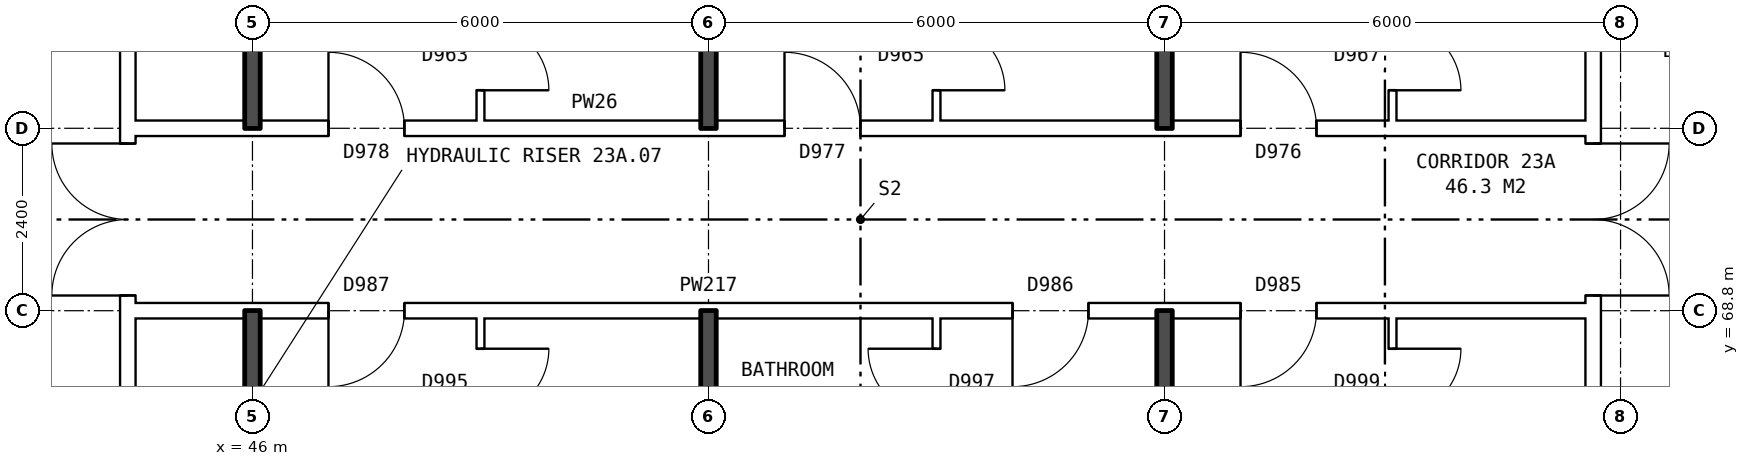
"""IFC4 building model, lengths in metres.
Left out: names, types, materials, properties, quantities, classifications, styles, units other than length and angle.
Written with IfcOpenShell. Run it as: python <this file> out.ifc"""

import sys

from ifc_helpers import new_model, si_unit, direction, frame, frame_2d, origin, place, context, subcontext, project, spatial, rectangle, extrude, element, fill, save


model = new_model("IFC4")
c1 = context("Model", 3, precision=1e-05, world=origin(), true_north=direction((0.0, 1.0)))
c2 = subcontext(c1, "Body", "Model", "MODEL_VIEW")
j1 = project(units=[si_unit("LENGTHUNIT", "METRE"), si_unit("PLANEANGLEUNIT", "RADIAN")], contexts=[c1])
p1 = place(None, origin())
s1 = spatial("IfcSite", under=j1, at=p1, CompositionType="ELEMENT")
p2 = place(p1, origin())
s2 = spatial("IfcBuilding", under=s1, at=p2, CompositionType="ELEMENT")
p3 = place(p2, frame((0.0, 0.0, 84.0)))
s3 = spatial("IfcBuildingStorey", under=s2, at=p3, CompositionType="ELEMENT", Elevation=84.0)
p4 = place(p3, frame((63.64, 63.9, 0.0), z_axis=(0.0, 0.0, 1.0), x_axis=(0.0, 1.0, 0.0)))
e1 = element("IfcWall", 1, at=p4, inside=s3, PredefinedType="PARTITIONING", context=c2, shape_type="SweptSolid", body=[
    extrude(rectangle(XDim=12.2, YDim=0.2, at=frame_2d((6.1, 0.0))), origin(), (0.0, 0.0, 1.0), 2.85),
])
p5 = place(p4, frame((5.1, 0.0, 0.0)))
e2 = element("IfcOpeningElement", 2, at=p5, cuts=e1, PredefinedType="OPENING", context=c2, shape_type="SweptSolid", body=[
    extrude(rectangle(XDim=2.0, YDim=2.1, at=frame_2d((1.0, 1.05))), frame((0.0, 0.11, 0.0), z_axis=(0.0, -1.0, 0.0), x_axis=(1.0, 0.0, 0.0)), (0.0, 0.0, 1.0), 0.22),
])
p6 = place(p3, frame((44.36, 63.9, 0.0), z_axis=(0.0, 0.0, 1.0), x_axis=(0.0, 1.0, 0.0)))
e3 = element("IfcWall", 3, at=p6, inside=s3, PredefinedType="PARTITIONING", context=c2, shape_type="SweptSolid", body=[
    extrude(rectangle(XDim=12.2, YDim=0.2, at=frame_2d((6.1, 0.0))), origin(), (0.0, 0.0, 1.0), 2.85),
])
p7 = place(p6, frame((5.1, 0.0, 0.0)))
e4 = element("IfcOpeningElement", 4, at=p7, cuts=e3, PredefinedType="OPENING", context=c2, shape_type="SweptSolid", body=[
    extrude(rectangle(XDim=2.0, YDim=2.1, at=frame_2d((1.0, 1.05))), frame((0.0, 0.11, 0.0), z_axis=(0.0, -1.0, 0.0), x_axis=(1.0, 0.0, 0.0)), (0.0, 0.0, 1.0), 0.22),
])
p8 = place(p3, frame((44.36, 68.8, 0.0), z_axis=(0.0, 0.0, 1.0), x_axis=(1.0, 0.0, 0.0)))
e5 = element("IfcWall", 5, at=p8, inside=s3, PredefinedType="PARTITIONING", context=c2, shape_type="SweptSolid", body=[
    extrude(rectangle(XDim=19.28, YDim=0.2, at=frame_2d((9.64, 0.0))), origin(), (0.0, 0.0, 1.0), 2.85),
])
p9 = place(p8, frame((14.64, 0.0, 0.0)))
e6 = element("IfcOpeningElement", 6, at=p9, cuts=e5, PredefinedType="OPENING", context=c2, shape_type="SweptSolid", body=[
    extrude(rectangle(XDim=1.0, YDim=2.1, at=frame_2d((0.5, 1.05))), frame((0.0, 0.11, 0.0), z_axis=(0.0, -1.0, 0.0), x_axis=(1.0, 0.0, 0.0)), (0.0, 0.0, 1.0), 0.22),
])
p10 = place(p8, frame((11.64, 0.0, 0.0)))
e7 = element("IfcOpeningElement", 7, at=p10, cuts=e5, PredefinedType="OPENING", context=c2, shape_type="SweptSolid", body=[
    extrude(rectangle(XDim=1.0, YDim=2.1, at=frame_2d((0.5, 1.05))), frame((0.0, 0.11, 0.0), z_axis=(0.0, -1.0, 0.0), x_axis=(1.0, 0.0, 0.0)), (0.0, 0.0, 1.0), 0.22),
])
p11 = place(p8, frame((2.64, 0.0, 0.0)))
e8 = element("IfcOpeningElement", 8, at=p11, cuts=e5, PredefinedType="OPENING", context=c2, shape_type="SweptSolid", body=[
    extrude(rectangle(XDim=1.0, YDim=2.1, at=frame_2d((0.5, 1.05))), frame((0.0, 0.11, 0.0), z_axis=(0.0, -1.0, 0.0), x_axis=(1.0, 0.0, 0.0)), (0.0, 0.0, 1.0), 0.22),
])
p12 = place(p3, frame((44.36, 71.2, 0.0), z_axis=(0.0, 0.0, 1.0), x_axis=(1.0, 0.0, 0.0)))
e9 = element("IfcWall", 9, at=p12, inside=s3, PredefinedType="PARTITIONING", context=c2, shape_type="SweptSolid", body=[
    extrude(rectangle(XDim=19.28, YDim=0.2, at=frame_2d((9.64, 0.0))), origin(), (0.0, 0.0, 1.0), 2.85),
])
p13 = place(p12, frame((14.64, 0.0, 0.0)))
e10 = element("IfcOpeningElement", 10, at=p13, cuts=e9, PredefinedType="OPENING", context=c2, shape_type="SweptSolid", body=[
    extrude(rectangle(XDim=1.0, YDim=2.1, at=frame_2d((0.5, 1.05))), frame((0.0, 0.11, 0.0), z_axis=(0.0, -1.0, 0.0), x_axis=(1.0, 0.0, 0.0)), (0.0, 0.0, 1.0), 0.22),
])
p14 = place(p12, frame((8.64, 0.0, 0.0)))
e11 = element("IfcOpeningElement", 11, at=p14, cuts=e9, PredefinedType="OPENING", context=c2, shape_type="SweptSolid", body=[
    extrude(rectangle(XDim=1.0, YDim=2.1, at=frame_2d((0.5, 1.05))), frame((0.0, 0.11, 0.0), z_axis=(0.0, -1.0, 0.0), x_axis=(1.0, 0.0, 0.0)), (0.0, 0.0, 1.0), 0.22),
])
p15 = place(p12, frame((2.64, 0.0, 0.0)))
e12 = element("IfcOpeningElement", 12, at=p15, cuts=e9, PredefinedType="OPENING", context=c2, shape_type="SweptSolid", body=[
    extrude(rectangle(XDim=1.0, YDim=2.1, at=frame_2d((0.5, 1.05))), frame((0.0, 0.11, 0.0), z_axis=(0.0, -1.0, 0.0), x_axis=(1.0, 0.0, 0.0)), (0.0, 0.0, 1.0), 0.22),
])
for number, where, z_axis, x_axis in (
    (13, (46.0, 63.8, 0.0), (0.0, 0.0, 1.0), (0.0, 1.0, 0.0)),
    (14, (46.0, 71.2, 0.0), (0.0, 0.0, 1.0), (0.0, 1.0, 0.0)),
):
    element("IfcWall", number, at=place(p3, frame(where, z_axis=z_axis, x_axis=x_axis)), inside=s3, PredefinedType="SOLIDWALL", context=c2, shape_type="SweptSolid", body=[
        extrude(rectangle(XDim=5.0, YDim=0.2, at=frame_2d((2.5, 0.0))), origin(), (0.0, 0.0, 1.0), 2.85),
    ])
p16 = place(p3, frame((49.0, 54.36, 0.0), z_axis=(0.0, 0.0, 1.0), x_axis=(0.0, 1.0, 0.0)))
e15 = element("IfcWall", 15, at=p16, inside=s3, PredefinedType="PARTITIONING", context=c2, shape_type="SweptSolid", body=[
    extrude(rectangle(XDim=14.34, YDim=0.1, at=frame_2d((7.17, 0.0))), origin(), (0.0, 0.0, 1.0), 2.85),
])
p17 = place(p16, frame((5.5, 0.0, 0.0)))
e16 = element("IfcOpeningElement", 16, at=p17, cuts=e15, PredefinedType="OPENING", context=c2, shape_type="SweptSolid", body=[
    extrude(rectangle(XDim=0.9, YDim=2.1, at=frame_2d((0.45, 1.05))), frame((0.0, 0.06, 0.0), z_axis=(0.0, -1.0, 0.0), x_axis=(1.0, 0.0, 0.0)), (0.0, 0.0, 1.0), 0.12),
])
p18 = place(p16, frame((13.04, 0.0, 0.0)))
e17 = element("IfcOpeningElement", 17, at=p18, cuts=e15, PredefinedType="OPENING", context=c2, shape_type="SweptSolid", body=[
    extrude(rectangle(XDim=0.9, YDim=2.1, at=frame_2d((0.45, 1.05))), frame((0.0, 0.06, 0.0), z_axis=(0.0, -1.0, 0.0), x_axis=(1.0, 0.0, 0.0)), (0.0, 0.0, 1.0), 0.12),
])
p19 = place(p3, frame((49.0, 71.3, 0.0), z_axis=(0.0, 0.0, 1.0), x_axis=(0.0, 1.0, 0.0)))
e18 = element("IfcWall", 18, at=p19, inside=s3, PredefinedType="PARTITIONING", context=c2, shape_type="SweptSolid", body=[
    extrude(rectangle(XDim=14.34, YDim=0.1, at=frame_2d((7.17, 0.0))), origin(), (0.0, 0.0, 1.0), 2.85),
])
p20 = place(p19, frame((7.94, 0.0, 0.0)))
e19 = element("IfcOpeningElement", 19, at=p20, cuts=e18, PredefinedType="OPENING", context=c2, shape_type="SweptSolid", body=[
    extrude(rectangle(XDim=0.9, YDim=2.1, at=frame_2d((0.45, 1.05))), frame((0.0, 0.06, 0.0), z_axis=(0.0, -1.0, 0.0), x_axis=(1.0, 0.0, 0.0)), (0.0, 0.0, 1.0), 0.12),
])
p21 = place(p19, frame((0.4, 0.0, 0.0)))
e20 = element("IfcOpeningElement", 20, at=p21, cuts=e18, PredefinedType="OPENING", context=c2, shape_type="SweptSolid", body=[
    extrude(rectangle(XDim=0.9, YDim=2.1, at=frame_2d((0.45, 1.05))), frame((0.0, 0.06, 0.0), z_axis=(0.0, -1.0, 0.0), x_axis=(1.0, 0.0, 0.0)), (0.0, 0.0, 1.0), 0.12),
])
for number, where, z_axis, x_axis in (
    (21, (52.0, 54.36, 0.0), (0.0, 0.0, 1.0), (0.0, 1.0, 0.0)),
    (22, (52.0, 71.2, 0.0), (0.0, 0.0, 1.0), (0.0, 1.0, 0.0)),
):
    element("IfcWall", number, at=place(p3, frame(where, z_axis=z_axis, x_axis=x_axis)), inside=s3, PredefinedType="SOLIDWALL", context=c2, shape_type="SweptSolid", body=[
        extrude(rectangle(XDim=14.44, YDim=0.2, at=frame_2d((7.22, 0.0))), origin(), (0.0, 0.0, 1.0), 2.85),
    ])
p22 = place(p3, frame((55.0, 54.36, 0.0), z_axis=(0.0, 0.0, 1.0), x_axis=(0.0, 1.0, 0.0)))
e23 = element("IfcWall", 23, at=p22, inside=s3, PredefinedType="PARTITIONING", context=c2, shape_type="SweptSolid", body=[
    extrude(rectangle(XDim=14.34, YDim=0.1, at=frame_2d((7.17, 0.0))), origin(), (0.0, 0.0, 1.0), 2.85),
])
p23 = place(p22, frame((6.7, 0.0, 0.0)))
e24 = element("IfcOpeningElement", 24, at=p23, cuts=e23, PredefinedType="OPENING", context=c2, shape_type="SweptSolid", body=[
    extrude(rectangle(XDim=0.9, YDim=2.1, at=frame_2d((0.45, 1.05))), frame((0.0, 0.06, 0.0), z_axis=(0.0, -1.0, 0.0), x_axis=(1.0, 0.0, 0.0)), (0.0, 0.0, 1.0), 0.12),
])
p24 = place(p22, frame((13.04, 0.0, 0.0)))
e25 = element("IfcOpeningElement", 25, at=p24, cuts=e23, PredefinedType="OPENING", context=c2, shape_type="SweptSolid", body=[
    extrude(rectangle(XDim=0.9, YDim=2.1, at=frame_2d((0.45, 1.05))), frame((0.0, 0.06, 0.0), z_axis=(0.0, -1.0, 0.0), x_axis=(1.0, 0.0, 0.0)), (0.0, 0.0, 1.0), 0.12),
])
p25 = place(p3, frame((55.0, 71.3, 0.0), z_axis=(0.0, 0.0, 1.0), x_axis=(0.0, 1.0, 0.0)))
e26 = element("IfcWall", 26, at=p25, inside=s3, PredefinedType="PARTITIONING", context=c2, shape_type="SweptSolid", body=[
    extrude(rectangle(XDim=14.34, YDim=0.1, at=frame_2d((7.17, 0.0))), origin(), (0.0, 0.0, 1.0), 2.85),
])
p26 = place(p25, frame((6.74, 0.0, 0.0)))
e27 = element("IfcOpeningElement", 27, at=p26, cuts=e26, PredefinedType="OPENING", context=c2, shape_type="SweptSolid", body=[
    extrude(rectangle(XDim=0.9, YDim=2.1, at=frame_2d((0.45, 1.05))), frame((0.0, 0.06, 0.0), z_axis=(0.0, -1.0, 0.0), x_axis=(1.0, 0.0, 0.0)), (0.0, 0.0, 1.0), 0.12),
])
p27 = place(p25, frame((0.4, 0.0, 0.0)))
e28 = element("IfcOpeningElement", 28, at=p27, cuts=e26, PredefinedType="OPENING", context=c2, shape_type="SweptSolid", body=[
    extrude(rectangle(XDim=0.9, YDim=2.1, at=frame_2d((0.45, 1.05))), frame((0.0, 0.06, 0.0), z_axis=(0.0, -1.0, 0.0), x_axis=(1.0, 0.0, 0.0)), (0.0, 0.0, 1.0), 0.12),
])
for number, where, z_axis, x_axis in (
    (29, (58.0, 54.36, 0.0), (0.0, 0.0, 1.0), (0.0, 1.0, 0.0)),
    (30, (58.0, 71.2, 0.0), (0.0, 0.0, 1.0), (0.0, 1.0, 0.0)),
):
    element("IfcWall", number, at=place(p3, frame(where, z_axis=z_axis, x_axis=x_axis)), inside=s3, PredefinedType="SOLIDWALL", context=c2, shape_type="SweptSolid", body=[
        extrude(rectangle(XDim=14.44, YDim=0.2, at=frame_2d((7.22, 0.0))), origin(), (0.0, 0.0, 1.0), 2.85),
    ])
p28 = place(p3, frame((61.0, 54.36, 0.0), z_axis=(0.0, 0.0, 1.0), x_axis=(0.0, 1.0, 0.0)))
e31 = element("IfcWall", 31, at=p28, inside=s3, PredefinedType="PARTITIONING", context=c2, shape_type="SweptSolid", body=[
    extrude(rectangle(XDim=14.34, YDim=0.1, at=frame_2d((7.17, 0.0))), origin(), (0.0, 0.0, 1.0), 2.85),
])
p29 = place(p28, frame((7.7, 0.0, 0.0)))
e32 = element("IfcOpeningElement", 32, at=p29, cuts=e31, PredefinedType="OPENING", context=c2, shape_type="SweptSolid", body=[
    extrude(rectangle(XDim=0.9, YDim=2.1, at=frame_2d((0.45, 1.05))), frame((0.0, 0.06, 0.0), z_axis=(0.0, -1.0, 0.0), x_axis=(1.0, 0.0, 0.0)), (0.0, 0.0, 1.0), 0.12),
])
p30 = place(p28, frame((13.04, 0.0, 0.0)))
e33 = element("IfcOpeningElement", 33, at=p30, cuts=e31, PredefinedType="OPENING", context=c2, shape_type="SweptSolid", body=[
    extrude(rectangle(XDim=0.9, YDim=2.1, at=frame_2d((0.45, 1.05))), frame((0.0, 0.06, 0.0), z_axis=(0.0, -1.0, 0.0), x_axis=(1.0, 0.0, 0.0)), (0.0, 0.0, 1.0), 0.12),
])
p31 = place(p3, frame((61.0, 71.3, 0.0), z_axis=(0.0, 0.0, 1.0), x_axis=(0.0, 1.0, 0.0)))
e34 = element("IfcWall", 34, at=p31, inside=s3, PredefinedType="PARTITIONING", context=c2, shape_type="SweptSolid", body=[
    extrude(rectangle(XDim=14.34, YDim=0.1, at=frame_2d((7.17, 0.0))), origin(), (0.0, 0.0, 1.0), 2.85),
])
p32 = place(p31, frame((7.94, 0.0, 0.0)))
e35 = element("IfcOpeningElement", 35, at=p32, cuts=e34, PredefinedType="OPENING", context=c2, shape_type="SweptSolid", body=[
    extrude(rectangle(XDim=0.9, YDim=2.1, at=frame_2d((0.45, 1.05))), frame((0.0, 0.06, 0.0), z_axis=(0.0, -1.0, 0.0), x_axis=(1.0, 0.0, 0.0)), (0.0, 0.0, 1.0), 0.12),
])
p33 = place(p31, frame((0.4, 0.0, 0.0)))
e36 = element("IfcOpeningElement", 36, at=p33, cuts=e34, PredefinedType="OPENING", context=c2, shape_type="SweptSolid", body=[
    extrude(rectangle(XDim=0.9, YDim=2.1, at=frame_2d((0.45, 1.05))), frame((0.0, 0.06, 0.0), z_axis=(0.0, -1.0, 0.0), x_axis=(1.0, 0.0, 0.0)), (0.0, 0.0, 1.0), 0.12),
])
p34 = place(p5, frame((2.0, 0.0, 0.0), z_axis=(0.0, 0.0, 1.0), x_axis=(-1.0, 0.0, 0.0)))
e37 = element("IfcDoor", 37, at=p34, inside=s3, OperationType="DOUBLE_DOOR_SINGLE_SWING", PredefinedType="DOOR", context=c2, shape_type="SweptSolid", body=[
    extrude(rectangle(XDim=2.0, YDim=2.1, at=frame_2d((1.0, 1.05))), frame((0.0, 0.025, 0.0), z_axis=(0.0, -1.0, 0.0), x_axis=(1.0, 0.0, 0.0)), (0.0, 0.0, 1.0), 0.05),
])
fill(e2, e37)
p35 = place(p7, origin())
e38 = element("IfcDoor", 38, at=p35, inside=s3, OperationType="DOUBLE_DOOR_SINGLE_SWING", PredefinedType="DOOR", context=c2, shape_type="SweptSolid", body=[
    extrude(rectangle(XDim=2.0, YDim=2.1, at=frame_2d((1.0, 1.05))), frame((0.0, 0.025, 0.0), z_axis=(0.0, -1.0, 0.0), x_axis=(1.0, 0.0, 0.0)), (0.0, 0.0, 1.0), 0.05),
])
fill(e4, e38)
p36 = place(p9, frame((1.0, 0.0, 0.0), z_axis=(0.0, 0.0, 1.0), x_axis=(-1.0, 0.0, 0.0)))
e39 = element("IfcDoor", 39, at=p36, inside=s3, OperationType="SINGLE_SWING_RIGHT", PredefinedType="DOOR", context=c2, shape_type="SweptSolid", body=[
    extrude(rectangle(XDim=1.0, YDim=2.1, at=frame_2d((0.5, 1.05))), frame((0.0, 0.025, 0.0), z_axis=(0.0, -1.0, 0.0), x_axis=(1.0, 0.0, 0.0)), (0.0, 0.0, 1.0), 0.05),
])
fill(e6, e39)
p37 = place(p30, frame((0.9, 0.0, 0.0), z_axis=(0.0, 0.0, 1.0), x_axis=(-1.0, 0.0, 0.0)))
e40 = element("IfcDoor", 40, at=p37, inside=s3, OperationType="SINGLE_SWING_LEFT", PredefinedType="DOOR", context=c2, shape_type="SweptSolid", body=[
    extrude(rectangle(XDim=0.9, YDim=2.1, at=frame_2d((0.45, 1.05))), frame((0.0, 0.025, 0.0), z_axis=(0.0, -1.0, 0.0), x_axis=(1.0, 0.0, 0.0)), (0.0, 0.0, 1.0), 0.05),
])
fill(e33, e40)
p38 = place(p10, frame((1.0, 0.0, 0.0), z_axis=(0.0, 0.0, 1.0), x_axis=(-1.0, 0.0, 0.0)))
e41 = element("IfcDoor", 41, at=p38, inside=s3, OperationType="SINGLE_SWING_RIGHT", PredefinedType="DOOR", context=c2, shape_type="SweptSolid", body=[
    extrude(rectangle(XDim=1.0, YDim=2.1, at=frame_2d((0.5, 1.05))), frame((0.0, 0.025, 0.0), z_axis=(0.0, -1.0, 0.0), x_axis=(1.0, 0.0, 0.0)), (0.0, 0.0, 1.0), 0.05),
])
fill(e7, e41)
p39 = place(p24, origin())
e42 = element("IfcDoor", 42, at=p39, inside=s3, OperationType="SINGLE_SWING_RIGHT", PredefinedType="DOOR", context=c2, shape_type="SweptSolid", body=[
    extrude(rectangle(XDim=0.9, YDim=2.1, at=frame_2d((0.45, 1.05))), frame((0.0, 0.025, 0.0), z_axis=(0.0, -1.0, 0.0), x_axis=(1.0, 0.0, 0.0)), (0.0, 0.0, 1.0), 0.05),
])
fill(e25, e42)
p40 = place(p11, frame((1.0, 0.0, 0.0), z_axis=(0.0, 0.0, 1.0), x_axis=(-1.0, 0.0, 0.0)))
e43 = element("IfcDoor", 43, at=p40, inside=s3, OperationType="SINGLE_SWING_RIGHT", PredefinedType="DOOR", context=c2, shape_type="SweptSolid", body=[
    extrude(rectangle(XDim=1.0, YDim=2.1, at=frame_2d((0.5, 1.05))), frame((0.0, 0.025, 0.0), z_axis=(0.0, -1.0, 0.0), x_axis=(1.0, 0.0, 0.0)), (0.0, 0.0, 1.0), 0.05),
])
fill(e8, e43)
p41 = place(p18, frame((0.9, 0.0, 0.0), z_axis=(0.0, 0.0, 1.0), x_axis=(-1.0, 0.0, 0.0)))
e44 = element("IfcDoor", 44, at=p41, inside=s3, OperationType="SINGLE_SWING_LEFT", PredefinedType="DOOR", context=c2, shape_type="SweptSolid", body=[
    extrude(rectangle(XDim=0.9, YDim=2.1, at=frame_2d((0.45, 1.05))), frame((0.0, 0.025, 0.0), z_axis=(0.0, -1.0, 0.0), x_axis=(1.0, 0.0, 0.0)), (0.0, 0.0, 1.0), 0.05),
])
fill(e17, e44)
p42 = place(p13, origin())
e45 = element("IfcDoor", 45, at=p42, inside=s3, OperationType="SINGLE_SWING_LEFT", PredefinedType="DOOR", context=c2, shape_type="SweptSolid", body=[
    extrude(rectangle(XDim=1.0, YDim=2.1, at=frame_2d((0.5, 1.05))), frame((0.0, 0.025, 0.0), z_axis=(0.0, -1.0, 0.0), x_axis=(1.0, 0.0, 0.0)), (0.0, 0.0, 1.0), 0.05),
])
fill(e10, e45)
p43 = place(p33, frame((0.9, 0.0, 0.0), z_axis=(0.0, 0.0, 1.0), x_axis=(-1.0, 0.0, 0.0)))
e46 = element("IfcDoor", 46, at=p43, inside=s3, OperationType="SINGLE_SWING_RIGHT", PredefinedType="DOOR", context=c2, shape_type="SweptSolid", body=[
    extrude(rectangle(XDim=0.9, YDim=2.1, at=frame_2d((0.45, 1.05))), frame((0.0, 0.025, 0.0), z_axis=(0.0, -1.0, 0.0), x_axis=(1.0, 0.0, 0.0)), (0.0, 0.0, 1.0), 0.05),
])
fill(e36, e46)
p44 = place(p14, origin())
e47 = element("IfcDoor", 47, at=p44, inside=s3, OperationType="SINGLE_SWING_LEFT", PredefinedType="DOOR", context=c2, shape_type="SweptSolid", body=[
    extrude(rectangle(XDim=1.0, YDim=2.1, at=frame_2d((0.5, 1.05))), frame((0.0, 0.025, 0.0), z_axis=(0.0, -1.0, 0.0), x_axis=(1.0, 0.0, 0.0)), (0.0, 0.0, 1.0), 0.05),
])
fill(e11, e47)
p45 = place(p27, frame((0.9, 0.0, 0.0), z_axis=(0.0, 0.0, 1.0), x_axis=(-1.0, 0.0, 0.0)))
e48 = element("IfcDoor", 48, at=p45, inside=s3, OperationType="SINGLE_SWING_RIGHT", PredefinedType="DOOR", context=c2, shape_type="SweptSolid", body=[
    extrude(rectangle(XDim=0.9, YDim=2.1, at=frame_2d((0.45, 1.05))), frame((0.0, 0.025, 0.0), z_axis=(0.0, -1.0, 0.0), x_axis=(1.0, 0.0, 0.0)), (0.0, 0.0, 1.0), 0.05),
])
fill(e28, e48)
p46 = place(p15, origin())
e49 = element("IfcDoor", 49, at=p46, inside=s3, OperationType="SINGLE_SWING_LEFT", PredefinedType="DOOR", context=c2, shape_type="SweptSolid", body=[
    extrude(rectangle(XDim=1.0, YDim=2.1, at=frame_2d((0.5, 1.05))), frame((0.0, 0.025, 0.0), z_axis=(0.0, -1.0, 0.0), x_axis=(1.0, 0.0, 0.0)), (0.0, 0.0, 1.0), 0.05),
])
fill(e12, e49)
p47 = place(p21, frame((0.9, 0.0, 0.0), z_axis=(0.0, 0.0, 1.0), x_axis=(-1.0, 0.0, 0.0)))
e50 = element("IfcDoor", 50, at=p47, inside=s3, OperationType="SINGLE_SWING_RIGHT", PredefinedType="DOOR", context=c2, shape_type="SweptSolid", body=[
    extrude(rectangle(XDim=0.9, YDim=2.1, at=frame_2d((0.45, 1.05))), frame((0.0, 0.025, 0.0), z_axis=(0.0, -1.0, 0.0), x_axis=(1.0, 0.0, 0.0)), (0.0, 0.0, 1.0), 0.05),
])
fill(e20, e50)
save(model, sys.argv[1])
